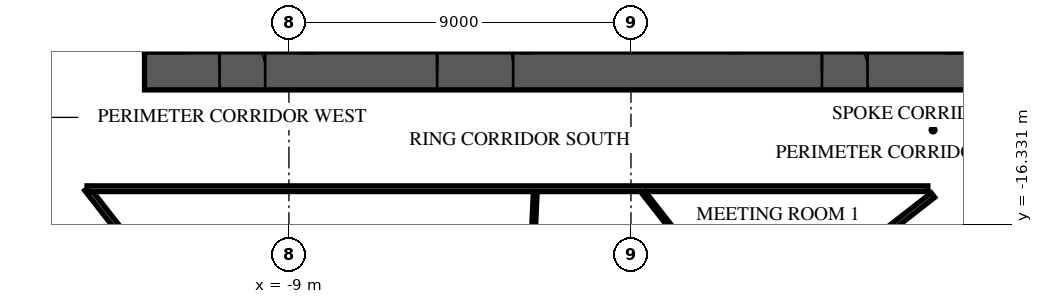
"""IFC4 building model, lengths in metres.
Left out: names, types, materials, properties, quantities, classifications, styles, units other than length and angle.
Written with IfcOpenShell. Run it as: python <this file> out.ifc"""

import sys

from ifc_helpers import new_model, si_unit, direction, frame, frame_2d, origin, place, context, subcontext, project, spatial, rectangle, extrude, element, fill, save


model = new_model("IFC4")
c1 = context("Model", 3, precision=1e-05, world=origin(), true_north=direction((0.0, 1.0)))
c2 = subcontext(c1, "Body", "Model", "MODEL_VIEW")
j1 = project(units=[si_unit("LENGTHUNIT", "METRE"), si_unit("PLANEANGLEUNIT", "RADIAN")], contexts=[c1])
p1 = place(None, origin())
s1 = spatial("IfcSite", under=j1, at=p1, CompositionType="ELEMENT")
p2 = place(p1, origin())
s2 = spatial("IfcBuilding", under=s1, at=p2, CompositionType="ELEMENT")
p3 = place(p2, frame((0.0, 0.0, 175.7)))
s3 = spatial("IfcBuildingStorey", under=s2, at=p3, CompositionType="ELEMENT", Elevation=175.7)
p4 = place(p3, frame((-12.8, -12.3, 0.0), z_axis=(0.0, 0.0, 1.0), x_axis=(1.0, 0.0, 0.0)))
e1 = element("IfcWall", 1, at=p4, inside=s3, PredefinedType="SHEAR", context=c2, shape_type="SweptSolid", body=[
    extrude(rectangle(XDim=25.6, YDim=1.0, at=frame_2d((12.8, 0.0))), origin(), (0.0, 0.0, 1.0), 3.6),
])
p5 = place(p4, frame((7.7, 0.0, 0.0)))
e2 = element("IfcOpeningElement", 2, at=p5, cuts=e1, PredefinedType="OPENING", context=c2, shape_type="SweptSolid", body=[
    extrude(rectangle(XDim=2.0, YDim=2.1, at=frame_2d((1.0, 1.05))), frame((0.0, 0.51, 0.0), z_axis=(0.0, -1.0, 0.0), x_axis=(1.0, 0.0, 0.0)), (0.0, 0.0, 1.0), 1.02),
])
p6 = place(p4, frame((17.825, 0.0, 0.0)))
e3 = element("IfcOpeningElement", 3, at=p6, cuts=e1, PredefinedType="OPENING", context=c2, shape_type="SweptSolid", body=[
    extrude(rectangle(XDim=1.2, YDim=2.1, at=frame_2d((0.6, 1.05))), frame((0.0, 0.51, 0.0), z_axis=(0.0, -1.0, 0.0), x_axis=(1.0, 0.0, 0.0)), (0.0, 0.0, 1.0), 1.02),
])
p7 = place(p4, frame((1.975, 0.0, 0.0)))
e4 = element("IfcOpeningElement", 4, at=p7, cuts=e1, PredefinedType="OPENING", context=c2, shape_type="SweptSolid", body=[
    extrude(rectangle(XDim=1.2, YDim=2.1, at=frame_2d((0.6, 1.05))), frame((0.0, 0.51, 0.0), z_axis=(0.0, -1.0, 0.0), x_axis=(1.0, 0.0, 0.0)), (0.0, 0.0, 1.0), 1.02),
])
p8 = place(p4, frame((22.425, 0.0, 0.0)))
e5 = element("IfcOpeningElement", 5, at=p8, cuts=e1, PredefinedType="OPENING", context=c2, shape_type="SweptSolid", body=[
    extrude(rectangle(XDim=1.2, YDim=2.1, at=frame_2d((0.6, 1.05))), frame((0.0, 0.51, 0.0), z_axis=(0.0, -1.0, 0.0), x_axis=(1.0, 0.0, 0.0)), (0.0, 0.0, 1.0), 1.02),
])
p9 = place(p3, frame((-36.503, -1.52, 0.0), z_axis=(0.0, 0.0, 1.0), x_axis=(0.615658293455, -0.788013239546, 0.0)))
e6 = element("IfcWall", 6, at=p9, inside=s3, PredefinedType="STANDARD", context=c2, shape_type="SweptSolid", body=[
    extrude(rectangle(XDim=42.552, YDim=0.6, at=frame_2d((21.276, 0.0))), origin(), (0.0, 0.0, 1.0), 3.6),
])
p10 = place(p9, frame((1.178, 0.0, 0.9)))
e7 = element("IfcOpeningElement", 7, at=p10, cuts=e6, PredefinedType="OPENING", context=c2, shape_type="SweptSolid", body=[
    extrude(rectangle(XDim=1.8, YDim=2.1, at=frame_2d((0.9, 1.05))), frame((0.0, 0.31, 0.0), z_axis=(0.0, -1.0, 0.0), x_axis=(1.0, 0.0, 0.0)), (0.0, 0.0, 1.0), 0.62),
])
p11 = place(p9, frame((5.396, 0.0, 0.9)))
e8 = element("IfcOpeningElement", 8, at=p11, cuts=e6, PredefinedType="OPENING", context=c2, shape_type="SweptSolid", body=[
    extrude(rectangle(XDim=1.8, YDim=2.1, at=frame_2d((0.9, 1.05))), frame((0.0, 0.31, 0.0), z_axis=(0.0, -1.0, 0.0), x_axis=(1.0, 0.0, 0.0)), (0.0, 0.0, 1.0), 0.62),
])
p12 = place(p9, frame((9.676, 0.0, 0.9)))
e9 = element("IfcOpeningElement", 9, at=p12, cuts=e6, PredefinedType="OPENING", context=c2, shape_type="SweptSolid", body=[
    extrude(rectangle(XDim=1.8, YDim=2.1, at=frame_2d((0.9, 1.05))), frame((0.0, 0.31, 0.0), z_axis=(0.0, -1.0, 0.0), x_axis=(1.0, 0.0, 0.0)), (0.0, 0.0, 1.0), 0.62),
])
p13 = place(p9, frame((13.956, 0.0, 0.9)))
e10 = element("IfcOpeningElement", 10, at=p13, cuts=e6, PredefinedType="OPENING", context=c2, shape_type="SweptSolid", body=[
    extrude(rectangle(XDim=1.8, YDim=2.1, at=frame_2d((0.9, 1.05))), frame((0.0, 0.31, 0.0), z_axis=(0.0, -1.0, 0.0), x_axis=(1.0, 0.0, 0.0)), (0.0, 0.0, 1.0), 0.62),
])
p14 = place(p9, frame((18.236, 0.0, 0.9)))
e11 = element("IfcOpeningElement", 11, at=p14, cuts=e6, PredefinedType="OPENING", context=c2, shape_type="SweptSolid", body=[
    extrude(rectangle(XDim=1.8, YDim=2.1, at=frame_2d((0.9, 1.05))), frame((0.0, 0.31, 0.0), z_axis=(0.0, -1.0, 0.0), x_axis=(1.0, 0.0, 0.0)), (0.0, 0.0, 1.0), 0.62),
])
p15 = place(p9, frame((22.516, 0.0, 0.9)))
e12 = element("IfcOpeningElement", 12, at=p15, cuts=e6, PredefinedType="OPENING", context=c2, shape_type="SweptSolid", body=[
    extrude(rectangle(XDim=1.8, YDim=2.1, at=frame_2d((0.9, 1.05))), frame((0.0, 0.31, 0.0), z_axis=(0.0, -1.0, 0.0), x_axis=(1.0, 0.0, 0.0)), (0.0, 0.0, 1.0), 0.62),
])
p16 = place(p9, frame((26.796, 0.0, 0.9)))
e13 = element("IfcOpeningElement", 13, at=p16, cuts=e6, PredefinedType="OPENING", context=c2, shape_type="SweptSolid", body=[
    extrude(rectangle(XDim=1.8, YDim=2.1, at=frame_2d((0.9, 1.05))), frame((0.0, 0.31, 0.0), z_axis=(0.0, -1.0, 0.0), x_axis=(1.0, 0.0, 0.0)), (0.0, 0.0, 1.0), 0.62),
])
p17 = place(p9, frame((35.356, 0.0, 0.9)))
e14 = element("IfcOpeningElement", 14, at=p17, cuts=e6, PredefinedType="OPENING", context=c2, shape_type="SweptSolid", body=[
    extrude(rectangle(XDim=1.8, YDim=2.1, at=frame_2d((0.9, 1.05))), frame((0.0, 0.31, 0.0), z_axis=(0.0, -1.0, 0.0), x_axis=(1.0, 0.0, 0.0)), (0.0, 0.0, 1.0), 0.62),
])
p18 = place(p9, frame((39.573, 0.0, 0.9)))
e15 = element("IfcOpeningElement", 15, at=p18, cuts=e6, PredefinedType="OPENING", context=c2, shape_type="SweptSolid", body=[
    extrude(rectangle(XDim=1.8, YDim=2.1, at=frame_2d((0.9, 1.05))), frame((0.0, 0.31, 0.0), z_axis=(0.0, -1.0, 0.0), x_axis=(1.0, 0.0, 0.0)), (0.0, 0.0, 1.0), 0.62),
])
p19 = place(p3, frame((-3.534, -35.882, 0.0), z_axis=(0.0, 0.0, 1.0), x_axis=(0.788011205374, 0.61566089709, 0.0)))
e16 = element("IfcWall", 16, at=p19, inside=s3, PredefinedType="STANDARD", context=c2, shape_type="SweptSolid", body=[
    extrude(rectangle(XDim=49.752, YDim=0.6, at=frame_2d((24.876, 0.0))), origin(), (0.0, 0.0, 1.0), 3.6),
])
p20 = place(p19, frame((1.161, 0.0, 0.9)))
e17 = element("IfcOpeningElement", 17, at=p20, cuts=e16, PredefinedType="OPENING", context=c2, shape_type="SweptSolid", body=[
    extrude(rectangle(XDim=2.1, YDim=2.1, at=frame_2d((1.05, 1.05))), frame((0.0, 0.31, 0.0), z_axis=(0.0, -1.0, 0.0), x_axis=(1.0, 0.0, 0.0)), (0.0, 0.0, 1.0), 0.62),
])
p21 = place(p19, frame((5.644, 0.0, 0.9)))
e18 = element("IfcOpeningElement", 18, at=p21, cuts=e16, PredefinedType="OPENING", context=c2, shape_type="SweptSolid", body=[
    extrude(rectangle(XDim=2.1, YDim=2.1, at=frame_2d((1.05, 1.05))), frame((0.0, 0.31, 0.0), z_axis=(0.0, -1.0, 0.0), x_axis=(1.0, 0.0, 0.0)), (0.0, 0.0, 1.0), 0.62),
])
p22 = place(p19, frame((10.189, 0.0, 0.9)))
e19 = element("IfcOpeningElement", 19, at=p22, cuts=e16, PredefinedType="OPENING", context=c2, shape_type="SweptSolid", body=[
    extrude(rectangle(XDim=2.1, YDim=2.1, at=frame_2d((1.05, 1.05))), frame((0.0, 0.31, 0.0), z_axis=(0.0, -1.0, 0.0), x_axis=(1.0, 0.0, 0.0)), (0.0, 0.0, 1.0), 0.62),
])
p23 = place(p19, frame((14.735, 0.0, 0.9)))
e20 = element("IfcOpeningElement", 20, at=p23, cuts=e16, PredefinedType="OPENING", context=c2, shape_type="SweptSolid", body=[
    extrude(rectangle(XDim=2.1, YDim=2.1, at=frame_2d((1.05, 1.05))), frame((0.0, 0.31, 0.0), z_axis=(0.0, -1.0, 0.0), x_axis=(1.0, 0.0, 0.0)), (0.0, 0.0, 1.0), 0.62),
])
p24 = place(p19, frame((19.28, 0.0, 0.9)))
e21 = element("IfcOpeningElement", 21, at=p24, cuts=e16, PredefinedType="OPENING", context=c2, shape_type="SweptSolid", body=[
    extrude(rectangle(XDim=2.1, YDim=2.1, at=frame_2d((1.05, 1.05))), frame((0.0, 0.31, 0.0), z_axis=(0.0, -1.0, 0.0), x_axis=(1.0, 0.0, 0.0)), (0.0, 0.0, 1.0), 0.62),
])
p25 = place(p19, frame((23.826, 0.0, 0.9)))
e22 = element("IfcOpeningElement", 22, at=p25, cuts=e16, PredefinedType="OPENING", context=c2, shape_type="SweptSolid", body=[
    extrude(rectangle(XDim=2.1, YDim=2.1, at=frame_2d((1.05, 1.05))), frame((0.0, 0.31, 0.0), z_axis=(0.0, -1.0, 0.0), x_axis=(1.0, 0.0, 0.0)), (0.0, 0.0, 1.0), 0.62),
])
p26 = place(p19, frame((28.371, 0.0, 0.9)))
e23 = element("IfcOpeningElement", 23, at=p26, cuts=e16, PredefinedType="OPENING", context=c2, shape_type="SweptSolid", body=[
    extrude(rectangle(XDim=2.1, YDim=2.1, at=frame_2d((1.05, 1.05))), frame((0.0, 0.31, 0.0), z_axis=(0.0, -1.0, 0.0), x_axis=(1.0, 0.0, 0.0)), (0.0, 0.0, 1.0), 0.62),
])
p27 = place(p19, frame((32.917, 0.0, 0.9)))
e24 = element("IfcOpeningElement", 24, at=p27, cuts=e16, PredefinedType="OPENING", context=c2, shape_type="SweptSolid", body=[
    extrude(rectangle(XDim=2.1, YDim=2.1, at=frame_2d((1.05, 1.05))), frame((0.0, 0.31, 0.0), z_axis=(0.0, -1.0, 0.0), x_axis=(1.0, 0.0, 0.0)), (0.0, 0.0, 1.0), 0.62),
])
p28 = place(p19, frame((37.462, 0.0, 0.9)))
e25 = element("IfcOpeningElement", 25, at=p28, cuts=e16, PredefinedType="OPENING", context=c2, shape_type="SweptSolid", body=[
    extrude(rectangle(XDim=2.1, YDim=2.1, at=frame_2d((1.05, 1.05))), frame((0.0, 0.31, 0.0), z_axis=(0.0, -1.0, 0.0), x_axis=(1.0, 0.0, 0.0)), (0.0, 0.0, 1.0), 0.62),
])
p29 = place(p19, frame((42.008, 0.0, 0.9)))
e26 = element("IfcOpeningElement", 26, at=p29, cuts=e16, PredefinedType="OPENING", context=c2, shape_type="SweptSolid", body=[
    extrude(rectangle(XDim=2.1, YDim=2.1, at=frame_2d((1.05, 1.05))), frame((0.0, 0.31, 0.0), z_axis=(0.0, -1.0, 0.0), x_axis=(1.0, 0.0, 0.0)), (0.0, 0.0, 1.0), 0.62),
])
p30 = place(p19, frame((46.491, 0.0, 0.9)))
e27 = element("IfcOpeningElement", 27, at=p30, cuts=e16, PredefinedType="OPENING", context=c2, shape_type="SweptSolid", body=[
    extrude(rectangle(XDim=2.1, YDim=2.1, at=frame_2d((1.05, 1.05))), frame((0.0, 0.31, 0.0), z_axis=(0.0, -1.0, 0.0), x_axis=(1.0, 0.0, 0.0)), (0.0, 0.0, 1.0), 0.62),
])
p31 = place(p3, frame((-26.789, -3.331, 0.0), z_axis=(0.0, 0.0, 1.0), x_axis=(0.615659714696, -0.788012129158, 0.0)))
e28 = element("IfcWall", 28, at=p31, inside=s3, PredefinedType="PARTITIONING", context=c2, shape_type="SweptSolid", body=[
    extrude(rectangle(XDim=27.811, YDim=0.15, at=frame_2d((13.905, 0.0))), origin(), (0.0, 0.0, 1.0), 3.15),
])
p32 = place(p31, frame((15.872, 0.0, 0.0)))
e29 = element("IfcOpeningElement", 29, at=p32, cuts=e28, PredefinedType="OPENING", context=c2, shape_type="SweptSolid", body=[
    extrude(rectangle(XDim=1.0, YDim=2.1, at=frame_2d((0.5, 1.05))), frame((0.0, 0.085, 0.0), z_axis=(0.0, -1.0, 0.0), x_axis=(1.0, 0.0, 0.0)), (0.0, 0.0, 1.0), 0.17),
])
p33 = place(p3, frame((-14.313, -15.401, 0.0), z_axis=(0.0, 0.0, 1.0), x_axis=(0.615613702547, -0.78804807546, 0.0)))
e30 = element("IfcWall", 30, at=p33, inside=s3, PredefinedType="PARTITIONING", context=c2, shape_type="SweptSolid", body=[
    extrude(rectangle(XDim=10.619, YDim=0.15, at=frame_2d((5.31, 0.0))), origin(), (0.0, 0.0, 1.0), 3.15),
])
p34 = place(p33, frame((3.3, 0.0, 0.0)))
e31 = element("IfcOpeningElement", 31, at=p34, cuts=e30, PredefinedType="OPENING", context=c2, shape_type="SweptSolid", body=[
    extrude(rectangle(XDim=1.8, YDim=2.1, at=frame_2d((0.9, 1.05))), frame((0.0, 0.085, 0.0), z_axis=(0.0, -1.0, 0.0), x_axis=(1.0, 0.0, 0.0)), (0.0, 0.0, 1.0), 0.17),
])
p35 = place(p3, frame((-14.312, -15.4, 0.0), z_axis=(0.0, 0.0, 1.0), x_axis=(1.0, 0.0, 0.0)))
e32 = element("IfcWall", 32, at=p35, inside=s3, PredefinedType="PARTITIONING", context=c2, shape_type="SweptSolid", body=[
    extrude(rectangle(XDim=22.125, YDim=0.15, at=frame_2d((11.062, 0.0))), origin(), (0.0, 0.0, 1.0), 3.15),
])
p36 = place(p3, frame((-1.825, -23.203, 0.0), z_axis=(0.0, 0.0, 1.0), x_axis=(0.788016612455, 0.615653976269, 0.0)))
e33 = element("IfcWall", 33, at=p36, inside=s3, PredefinedType="PARTITIONING", context=c2, shape_type="SweptSolid", body=[
    extrude(rectangle(XDim=12.399, YDim=0.15, at=frame_2d((6.2, 0.0))), origin(), (0.0, 0.0, 1.0), 3.15),
])
p37 = place(p36, frame((7.492, 0.0, 0.0)))
e34 = element("IfcOpeningElement", 34, at=p37, cuts=e33, PredefinedType="OPENING", context=c2, shape_type="SweptSolid", body=[
    extrude(rectangle(XDim=1.0, YDim=2.1, at=frame_2d((0.5, 1.05))), frame((0.0, 0.085, 0.0), z_axis=(0.0, -1.0, 0.0), x_axis=(1.0, 0.0, 0.0)), (0.0, 0.0, 1.0), 0.17),
])
p38 = place(p3, frame((-0.348, -25.095, 0.0), z_axis=(0.0, 0.0, 1.0), x_axis=(0.788010131951, 0.615662271008, 0.0)))
e35 = element("IfcWall", 35, at=p38, inside=s3, PredefinedType="PARTITIONING", context=c2, shape_type="SweptSolid", body=[
    extrude(rectangle(XDim=31.448, YDim=0.15, at=frame_2d((15.724, 0.0))), origin(), (0.0, 0.0, 1.0), 3.15),
])
p39 = place(p38, frame((4.801, 0.0, 0.0)))
e36 = element("IfcOpeningElement", 36, at=p39, cuts=e35, PredefinedType="OPENING", context=c2, shape_type="SweptSolid", body=[
    extrude(rectangle(XDim=1.8, YDim=2.1, at=frame_2d((0.9, 1.05))), frame((0.0, 0.085, 0.0), z_axis=(0.0, -1.0, 0.0), x_axis=(1.0, 0.0, 0.0)), (0.0, 0.0, 1.0), 0.17),
])
p40 = place(p38, frame((0.301, 0.0, 0.0)))
e37 = element("IfcOpeningElement", 37, at=p40, cuts=e35, PredefinedType="OPENING", context=c2, shape_type="SweptSolid", body=[
    extrude(rectangle(XDim=1.0, YDim=2.1, at=frame_2d((0.5, 1.05))), frame((0.0, 0.085, 0.0), z_axis=(0.0, -1.0, 0.0), x_axis=(1.0, 0.0, 0.0)), (0.0, 0.0, 1.0), 0.17),
])
p41 = place(p38, frame((19.226, 0.0, 0.0)))
e38 = element("IfcOpeningElement", 38, at=p41, cuts=e35, PredefinedType="OPENING", context=c2, shape_type="SweptSolid", body=[
    extrude(rectangle(XDim=1.0, YDim=2.1, at=frame_2d((0.5, 1.05))), frame((0.0, 0.085, 0.0), z_axis=(0.0, -1.0, 0.0), x_axis=(1.0, 0.0, 0.0)), (0.0, 0.0, 1.0), 0.17),
])
p42 = place(p38, frame((30.072, 0.0, 0.0)))
e39 = element("IfcOpeningElement", 39, at=p42, cuts=e35, PredefinedType="OPENING", context=c2, shape_type="SweptSolid", body=[
    extrude(rectangle(XDim=1.0, YDim=2.1, at=frame_2d((0.5, 1.05))), frame((0.0, 0.085, 0.0), z_axis=(0.0, -1.0, 0.0), x_axis=(1.0, 0.0, 0.0)), (0.0, 0.0, 1.0), 0.17),
])
p43 = place(p3, frame((-3.31, -33.135, 0.0), z_axis=(0.0, 0.0, 1.0), x_axis=(0.044752286744, 0.998998114528, 0.0)))
e40 = element("IfcWall", 40, at=p43, inside=s3, PredefinedType="PARTITIONING", context=c2, shape_type="SweptSolid", body=[
    extrude(rectangle(XDim=17.676, YDim=0.1, at=frame_2d((8.838, 0.0))), origin(), (0.0, 0.0, 1.0), 2.9),
])
p44 = place(p3, frame((0.337, -15.506, 0.0), z_axis=(0.0, 0.0, 1.0), x_axis=(0.615683690883, -0.787993396407, 0.0)))
e41 = element("IfcWall", 41, at=p44, inside=s3, PredefinedType="PARTITIONING", context=c2, shape_type="SweptSolid", body=[
    extrude(rectangle(XDim=4.66, YDim=0.1, at=frame_2d((2.33, 0.0))), origin(), (0.0, 0.0, 1.0), 3.15),
])
p45 = place(p5, origin())
e42 = element("IfcDoor", 42, at=p45, inside=s3, OperationType="SINGLE_SWING_LEFT", PredefinedType="DOOR", context=c2, shape_type="SweptSolid", body=[
    extrude(rectangle(XDim=2.0, YDim=2.1, at=frame_2d((1.0, 1.05))), frame((0.0, 0.025, 0.0), z_axis=(0.0, -1.0, 0.0), x_axis=(1.0, 0.0, 0.0)), (0.0, 0.0, 1.0), 0.05),
])
fill(e2, e42)
p46 = place(p6, origin())
e43 = element("IfcDoor", 43, at=p46, inside=s3, OperationType="SINGLE_SWING_LEFT", PredefinedType="DOOR", context=c2, shape_type="SweptSolid", body=[
    extrude(rectangle(XDim=1.2, YDim=2.1, at=frame_2d((0.6, 1.05))), frame((0.0, 0.025, 0.0), z_axis=(0.0, -1.0, 0.0), x_axis=(1.0, 0.0, 0.0)), (0.0, 0.0, 1.0), 0.05),
])
fill(e3, e43)
p47 = place(p7, origin())
e44 = element("IfcDoor", 44, at=p47, inside=s3, OperationType="SINGLE_SWING_LEFT", PredefinedType="DOOR", context=c2, shape_type="SweptSolid", body=[
    extrude(rectangle(XDim=1.2, YDim=2.1, at=frame_2d((0.6, 1.05))), frame((0.0, 0.025, 0.0), z_axis=(0.0, -1.0, 0.0), x_axis=(1.0, 0.0, 0.0)), (0.0, 0.0, 1.0), 0.05),
])
fill(e4, e44)
save(model, sys.argv[1])
